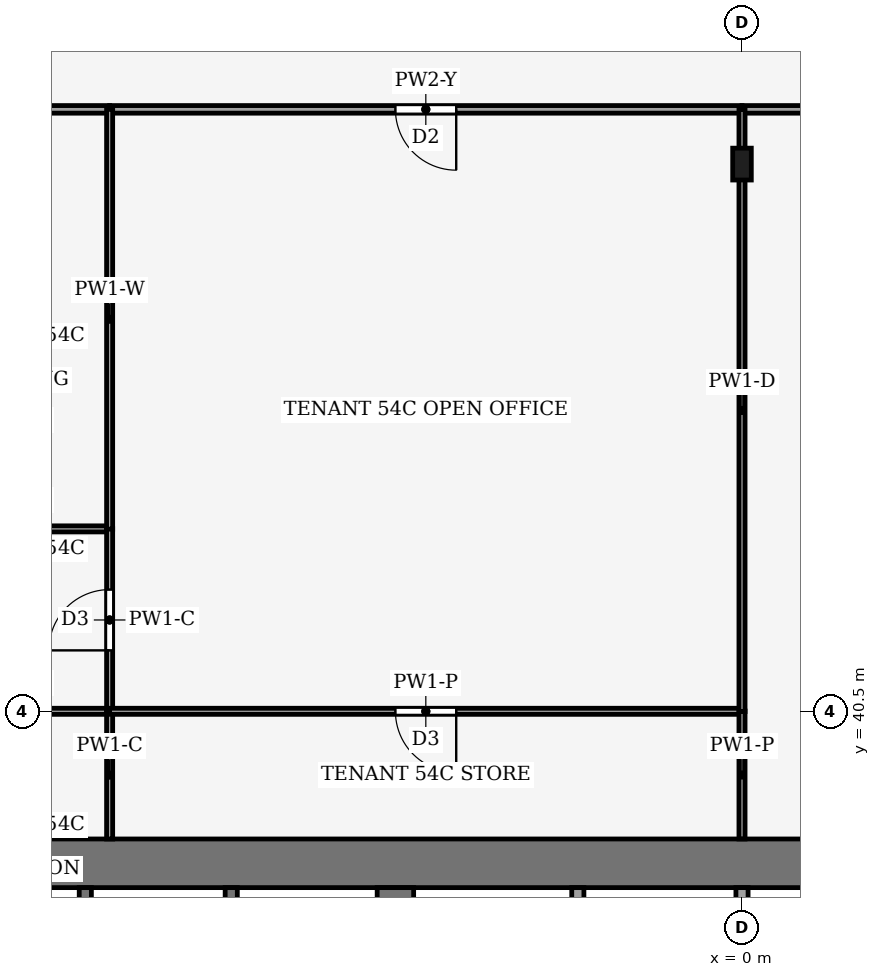
"""IFC4 building model, lengths in metres.
Left out: names, types, materials, properties, quantities, classifications, styles, units other than length and angle.
Written with IfcOpenShell. Run it as: python <this file> out.ifc"""

import sys

from ifc_helpers import new_model, si_unit, direction, frame, frame_2d, origin, origin_2d, place, context, subcontext, project, spatial, rectangle, i_section, extrude, element, fill, save


model = new_model("IFC4")
c1 = context("Model", 3, precision=1e-05, world=origin(), true_north=direction((0.0, 1.0)))
c2 = subcontext(c1, "Body", "Model", "MODEL_VIEW")
j1 = project(units=[si_unit("LENGTHUNIT", "METRE"), si_unit("PLANEANGLEUNIT", "RADIAN")], contexts=[c1])
p1 = place(None, origin())
s1 = spatial("IfcSite", under=j1, at=p1, CompositionType="ELEMENT")
p2 = place(p1, origin())
s2 = spatial("IfcBuilding", under=s1, at=p2, CompositionType="ELEMENT")
p3 = place(p2, frame((0.0, 0.0, 238.0)))
s3 = spatial("IfcBuildingStorey", under=s2, at=p3, CompositionType="ELEMENT", Elevation=238.0)
p4 = place(p3, frame((-13.4, 38.0, -0.13), z_axis=(0.0, 0.0, 1.0), x_axis=(1.0, 0.0, 0.0)))
e1 = element("IfcWall", 1, at=p4, inside=s3, PredefinedType="SHEAR", context=c2, shape_type="SweptSolid", body=[
    extrude(rectangle(XDim=26.8, YDim=0.8, at=frame_2d((13.4, 0.0))), origin(), (0.0, 0.0, 1.0), 4.0),
])
p5 = place(p3, frame((-5.7, 18.4, -0.13), z_axis=(0.0, 0.0, 1.0), x_axis=(0.0, 1.0, 0.0)))
e2 = element("IfcWall", 2, at=p5, inside=s3, PredefinedType="SHEAR", context=c2, shape_type="SweptSolid", body=[
    extrude(rectangle(XDim=19.2, YDim=0.6, at=frame_2d((9.6, 0.0))), origin(), (0.0, 0.0, 1.0), 4.0),
])
p6 = place(p5, frame((8.35, 0.0, 0.13)))
e3 = element("IfcOpeningElement", 3, at=p6, cuts=e2, PredefinedType="OPENING", context=c2, shape_type="SweptSolid", body=[
    extrude(rectangle(XDim=0.9, YDim=2.1, at=frame_2d((0.45, 1.05))), frame((0.0, 0.31, 0.0), z_axis=(0.0, -1.0, 0.0), x_axis=(1.0, 0.0, 0.0)), (0.0, 0.0, 1.0), 0.62),
])
p7 = place(p3, frame((0.0, 49.5, 0.0), z_axis=(0.0, 0.0, 1.0), x_axis=(1.0, 0.0, 0.0)))
e4 = element("IfcColumn", 4, at=p7, inside=s3, PredefinedType="COLUMN", context=c2, shape_type="SweptSolid", body=[
    extrude(i_section(OverallWidth=0.306, OverallDepth=0.524, WebThickness=0.012, FlangeThickness=0.04, FilletRadius=0.027, at=origin_2d()), origin(), (0.0, 0.0, 1.0), 4.0),
])
for number, where, z_axis, x_axis in (
    (5, (-10.8, 34.0, 0.0), (0.0, 0.0, 1.0), (0.0, 1.0, 0.0)),
    (6, (-8.4, 34.0, 0.0), (0.0, 0.0, 1.0), (0.0, 1.0, 0.0)),
    (7, (-2.7, 34.0, 0.0), (0.0, 0.0, 1.0), (0.0, 1.0, 0.0)),
    (8, (0.0, 34.0, 0.0), (0.0, 0.0, 1.0), (0.0, 1.0, 0.0)),
):
    element("IfcWall", number, at=place(p3, frame(where, z_axis=z_axis, x_axis=x_axis)), inside=s3, PredefinedType="PARTITIONING", context=c2, shape_type="SweptSolid", body=[
        extrude(rectangle(XDim=3.6, YDim=0.2, at=frame_2d((1.8, 0.0))), origin(), (0.0, 0.0, 1.0), 3.87),
    ])
p8 = place(p3, frame((-10.4, 50.4, 0.0), z_axis=(0.0, 0.0, 1.0), x_axis=(-1.0, 0.0, 0.0)))
e9 = element("IfcWall", 9, at=p8, inside=s3, PredefinedType="PARTITIONING", context=c2, shape_type="SweptSolid", body=[
    extrude(rectangle(XDim=3.0, YDim=0.125, at=frame_2d((1.5, 0.0))), origin(), (0.0, 0.0, 1.0), 3.24),
])
p9 = place(p3, frame((0.0, 50.4, 0.0), z_axis=(0.0, 0.0, 1.0), x_axis=(-1.0, 0.0, 0.0)))
e10 = element("IfcWall", 10, at=p9, inside=s3, PredefinedType="PARTITIONING", context=c2, shape_type="SweptSolid", body=[
    extrude(rectangle(XDim=10.4, YDim=0.125, at=frame_2d((5.2, 0.0))), origin(), (0.0, 0.0, 1.0), 3.24),
])
p10 = place(p9, frame((4.7, 0.0, 0.0)))
e11 = element("IfcOpeningElement", 11, at=p10, cuts=e10, PredefinedType="OPENING", context=c2, shape_type="SweptSolid", body=[
    extrude(rectangle(XDim=1.0, YDim=2.1, at=frame_2d((0.5, 1.05))), frame((0.0, 0.073, 0.0), z_axis=(0.0, -1.0, 0.0), x_axis=(1.0, 0.0, 0.0)), (0.0, 0.0, 1.0), 0.145),
])
p11 = place(p3, frame((10.4, 50.4, 0.0), z_axis=(0.0, 0.0, 1.0), x_axis=(-1.0, 0.0, 0.0)))
e12 = element("IfcWall", 12, at=p11, inside=s3, PredefinedType="PARTITIONING", context=c2, shape_type="SweptSolid", body=[
    extrude(rectangle(XDim=10.4, YDim=0.125, at=frame_2d((5.2, 0.0))), origin(), (0.0, 0.0, 1.0), 3.24),
])
p12 = place(p11, frame((4.7, 0.0, 0.0)))
e13 = element("IfcOpeningElement", 13, at=p12, cuts=e12, PredefinedType="OPENING", context=c2, shape_type="SweptSolid", body=[
    extrude(rectangle(XDim=1.0, YDim=2.1, at=frame_2d((0.5, 1.05))), frame((0.0, 0.073, 0.0), z_axis=(0.0, -1.0, 0.0), x_axis=(1.0, 0.0, 0.0)), (0.0, 0.0, 1.0), 0.145),
])
p13 = place(p3, frame((-10.4, 40.5, 0.0), z_axis=(0.0, 0.0, 1.0), x_axis=(-1.0, 0.0, 0.0)))
e14 = element("IfcWall", 14, at=p13, inside=s3, PredefinedType="PARTITIONING", context=c2, shape_type="SweptSolid", body=[
    extrude(rectangle(XDim=3.0, YDim=0.1, at=frame_2d((1.5, 0.0))), origin(), (0.0, 0.0, 1.0), 3.44),
])
p14 = place(p3, frame((-10.4, 38.4, 0.0), z_axis=(0.0, 0.0, 1.0), x_axis=(0.0, 1.0, 0.0)))
e15 = element("IfcWall", 15, at=p14, inside=s3, PredefinedType="PARTITIONING", context=c2, shape_type="SweptSolid", body=[
    extrude(rectangle(XDim=2.1, YDim=0.1, at=frame_2d((1.05, 0.0))), origin(), (0.0, 0.0, 1.0), 3.87),
])
p15 = place(p3, frame((-10.4, 43.5, 0.0), z_axis=(0.0, 0.0, 1.0), x_axis=(-1.0, 0.0, 0.0)))
e16 = element("IfcWall", 16, at=p15, inside=s3, PredefinedType="PARTITIONING", context=c2, shape_type="SweptSolid", body=[
    extrude(rectangle(XDim=3.0, YDim=0.1, at=frame_2d((1.5, 0.0))), origin(), (0.0, 0.0, 1.0), 3.44),
])
p16 = place(p3, frame((-10.4, 40.5, 0.0), z_axis=(0.0, 0.0, 1.0), x_axis=(0.0, 1.0, 0.0)))
e17 = element("IfcWall", 17, at=p16, inside=s3, PredefinedType="PARTITIONING", context=c2, shape_type="SweptSolid", body=[
    extrude(rectangle(XDim=3.004, YDim=0.1, at=frame_2d((1.502, 0.0))), origin(), (0.0, 0.0, 1.0), 3.87),
])
p17 = place(p16, frame((1.002, 0.0, 0.0)))
e18 = element("IfcOpeningElement", 18, at=p17, cuts=e17, PredefinedType="OPENING", context=c2, shape_type="SweptSolid", body=[
    extrude(rectangle(XDim=1.0, YDim=2.1, at=frame_2d((0.5, 1.05))), frame((0.0, 0.06, 0.0), z_axis=(0.0, -1.0, 0.0), x_axis=(1.0, 0.0, 0.0)), (0.0, 0.0, 1.0), 0.12),
])
p18 = place(p3, frame((-10.4, 43.496, 0.0), z_axis=(0.0, 0.0, 1.0), x_axis=(0.0, 1.0, 0.0)))
e19 = element("IfcWall", 19, at=p18, inside=s3, PredefinedType="PARTITIONING", context=c2, shape_type="SweptSolid", body=[
    extrude(rectangle(XDim=6.904, YDim=0.1, at=frame_2d((3.452, 0.0))), origin(), (0.0, 0.0, 1.0), 3.24),
])
p19 = place(p3, frame((0.0, 40.5, 0.0), z_axis=(0.0, 0.0, 1.0), x_axis=(-1.0, 0.0, 0.0)))
e20 = element("IfcWall", 20, at=p19, inside=s3, PredefinedType="PARTITIONING", context=c2, shape_type="SweptSolid", body=[
    extrude(rectangle(XDim=10.4, YDim=0.1, at=frame_2d((5.2, 0.0))), origin(), (0.0, 0.0, 1.0), 3.44),
])
p20 = place(p19, frame((4.7, 0.0, 0.0)))
e21 = element("IfcOpeningElement", 21, at=p20, cuts=e20, PredefinedType="OPENING", context=c2, shape_type="SweptSolid", body=[
    extrude(rectangle(XDim=1.0, YDim=2.1, at=frame_2d((0.5, 1.05))), frame((0.0, 0.06, 0.0), z_axis=(0.0, -1.0, 0.0), x_axis=(1.0, 0.0, 0.0)), (0.0, 0.0, 1.0), 0.12),
])
p21 = place(p3, frame((0.0, 38.4, 0.0), z_axis=(0.0, 0.0, 1.0), x_axis=(0.0, 1.0, 0.0)))
e22 = element("IfcWall", 22, at=p21, inside=s3, PredefinedType="PARTITIONING", context=c2, shape_type="SweptSolid", body=[
    extrude(rectangle(XDim=2.104, YDim=0.1, at=frame_2d((1.052, 0.0))), origin(), (0.0, 0.0, 1.0), 3.44),
])
p22 = place(p3, frame((0.0, 40.496, 0.0), z_axis=(0.0, 0.0, 1.0), x_axis=(0.0, 1.0, 0.0)))
e23 = element("IfcWall", 23, at=p22, inside=s3, PredefinedType="PARTITIONING", context=c2, shape_type="SweptSolid", body=[
    extrude(rectangle(XDim=9.904, YDim=0.1, at=frame_2d((4.952, 0.0))), origin(), (0.0, 0.0, 1.0), 3.29),
])
p23 = place(p10, origin())
e24 = element("IfcDoor", 24, at=p23, inside=s3, OperationType="SINGLE_SWING_LEFT", PredefinedType="DOOR", context=c2, shape_type="SweptSolid", body=[
    extrude(rectangle(XDim=1.0, YDim=2.1, at=frame_2d((0.5, 1.05))), frame((0.0, 0.025, 0.0), z_axis=(0.0, -1.0, 0.0), x_axis=(1.0, 0.0, 0.0)), (0.0, 0.0, 1.0), 0.05),
])
fill(e11, e24)
p24 = place(p17, origin())
e25 = element("IfcDoor", 25, at=p24, inside=s3, OperationType="SINGLE_SWING_LEFT", PredefinedType="DOOR", context=c2, shape_type="SweptSolid", body=[
    extrude(rectangle(XDim=1.0, YDim=2.1, at=frame_2d((0.5, 1.05))), frame((0.0, 0.025, 0.0), z_axis=(0.0, -1.0, 0.0), x_axis=(1.0, 0.0, 0.0)), (0.0, 0.0, 1.0), 0.05),
])
fill(e18, e25)
p25 = place(p20, origin())
e26 = element("IfcDoor", 26, at=p25, inside=s3, OperationType="SINGLE_SWING_RIGHT", PredefinedType="DOOR", context=c2, shape_type="SweptSolid", body=[
    extrude(rectangle(XDim=1.0, YDim=2.1, at=frame_2d((0.5, 1.05))), frame((0.0, 0.025, 0.0), z_axis=(0.0, -1.0, 0.0), x_axis=(1.0, 0.0, 0.0)), (0.0, 0.0, 1.0), 0.05),
])
fill(e21, e26)
save(model, sys.argv[1])
